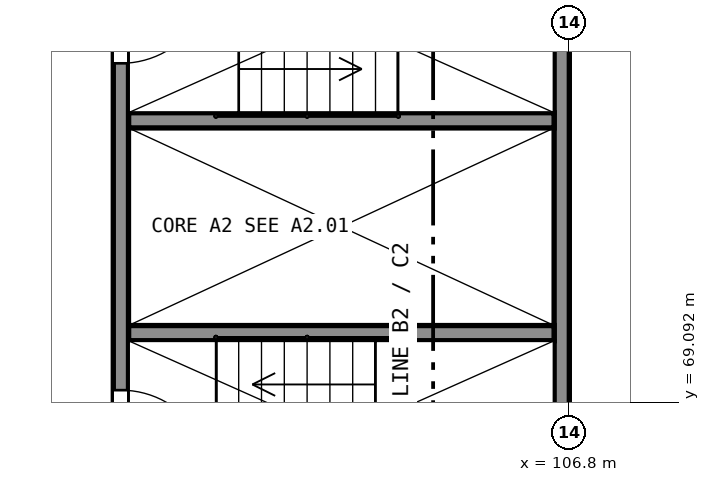
"""IFC4 building model, lengths in metres.
Left out: names, types, materials, properties, quantities, classifications, styles, units other than length and angle.
Written with IfcOpenShell. Run it as: python <this file> out.ifc"""

import sys

from ifc_helpers import new_model, si_unit, direction, frame, frame_2d, origin, place, context, subcontext, project, spatial, rectangle, extrude, element, fill, save


model = new_model("IFC4")
c1 = context("Model", 3, precision=1e-05, world=origin(), true_north=direction((0.0, 1.0)))
c2 = subcontext(c1, "Body", "Model", "MODEL_VIEW")
j1 = project(units=[si_unit("LENGTHUNIT", "METRE"), si_unit("PLANEANGLEUNIT", "RADIAN")], contexts=[c1])
p1 = place(None, origin())
s1 = spatial("IfcSite", under=j1, at=p1, CompositionType="ELEMENT")
p2 = place(p1, origin())
s2 = spatial("IfcBuilding", under=s1, at=p2, CompositionType="ELEMENT")
p3 = place(p2, frame((0.0, 0.0, 10.5)))
s3 = spatial("IfcBuildingStorey", under=s2, at=p3, CompositionType="ELEMENT", Elevation=10.5)
p4 = place(p3, frame((106.7, 67.4, 0.0), z_axis=(0.0, 0.0, 1.0), x_axis=(0.0, 1.0, 0.0)))
e1 = element("IfcWall", 1, at=p4, inside=s3, PredefinedType="SHEAR", context=c2, shape_type="SweptSolid", body=[
    extrude(rectangle(XDim=8.0, YDim=0.2, at=frame_2d((4.0, 0.0))), origin(), (0.0, 0.0, 1.0), 9.5),
])
p5 = place(p3, frame((100.9, 67.4, 0.0), z_axis=(0.0, 0.0, 1.0), x_axis=(0.0, 1.0, 0.0)))
e2 = element("IfcWall", 2, at=p5, inside=s3, PredefinedType="SHEAR", context=c2, shape_type="SweptSolid", body=[
    extrude(rectangle(XDim=8.0, YDim=0.2, at=frame_2d((4.0, 0.0))), origin(), (0.0, 0.0, 1.0), 9.5),
])
p6 = place(p5, frame((0.65, 0.0, 0.0)))
e3 = element("IfcOpeningElement", 3, at=p6, cuts=e2, PredefinedType="OPENING", context=c2, shape_type="SweptSolid", body=[
    extrude(rectangle(XDim=1.2, YDim=2.1, at=frame_2d((0.6, 1.05))), frame((0.0, 0.11, 0.0), z_axis=(0.0, -1.0, 0.0), x_axis=(1.0, 0.0, 0.0)), (0.0, 0.0, 1.0), 0.22),
])
p7 = place(p5, frame((6.15, 0.0, 0.0)))
e4 = element("IfcOpeningElement", 4, at=p7, cuts=e2, PredefinedType="OPENING", context=c2, shape_type="SweptSolid", body=[
    extrude(rectangle(XDim=1.2, YDim=2.1, at=frame_2d((0.6, 1.05))), frame((0.0, 0.11, 0.0), z_axis=(0.0, -1.0, 0.0), x_axis=(1.0, 0.0, 0.0)), (0.0, 0.0, 1.0), 0.22),
])
for number, where, z_axis, x_axis in (
    (5, (101.0, 70.0, 0.0), (0.0, 0.0, 1.0), (1.0, 0.0, 0.0)),
    (6, (101.0, 72.8, 0.0), (0.0, 0.0, 1.0), (1.0, 0.0, 0.0)),
):
    element("IfcWall", number, at=place(p3, frame(where, z_axis=z_axis, x_axis=x_axis)), inside=s3, PredefinedType="SHEAR", context=c2, shape_type="SweptSolid", body=[
        extrude(rectangle(XDim=5.6, YDim=0.2, at=frame_2d((2.8, 0.0))), origin(), (0.0, 0.0, 1.0), 9.5),
    ])
p8 = place(p6, origin())
e7 = element("IfcDoor", 7, at=p8, inside=s3, OperationType="SINGLE_SWING_LEFT", PredefinedType="DOOR", context=c2, shape_type="SweptSolid", body=[
    extrude(rectangle(XDim=1.2, YDim=2.1, at=frame_2d((0.6, 1.05))), frame((0.0, 0.025, 0.0), z_axis=(0.0, -1.0, 0.0), x_axis=(1.0, 0.0, 0.0)), (0.0, 0.0, 1.0), 0.05),
])
fill(e3, e7)
p9 = place(p7, origin())
e8 = element("IfcDoor", 8, at=p9, inside=s3, OperationType="SINGLE_SWING_RIGHT", PredefinedType="DOOR", context=c2, shape_type="SweptSolid", body=[
    extrude(rectangle(XDim=1.2, YDim=2.1, at=frame_2d((0.6, 1.05))), frame((0.0, 0.025, 0.0), z_axis=(0.0, -1.0, 0.0), x_axis=(1.0, 0.0, 0.0)), (0.0, 0.0, 1.0), 0.05),
])
fill(e4, e8)
save(model, sys.argv[1])
